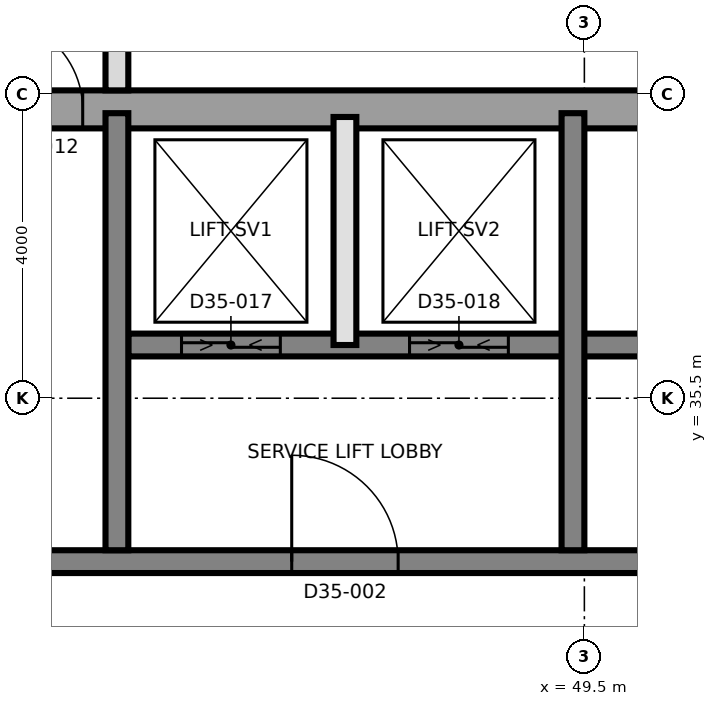
"""IFC4 building model, lengths in metres.
Left out: names, types, materials, properties, quantities, classifications, styles, units other than length and angle.
Written with IfcOpenShell. Run it as: python <this file> out.ifc"""

import sys

from ifc_helpers import new_model, si_unit, direction, frame, frame_2d, origin, place, context, subcontext, project, spatial, rectangle, extrude, element, fill, save


model = new_model("IFC4")
c1 = context("Model", 3, precision=1e-05, world=origin(), true_north=direction((0.0, 1.0)))
c2 = subcontext(c1, "Body", "Model", "MODEL_VIEW")
j1 = project(units=[si_unit("LENGTHUNIT", "METRE"), si_unit("PLANEANGLEUNIT", "RADIAN")], contexts=[c1])
p1 = place(None, origin())
s1 = spatial("IfcSite", under=j1, at=p1, CompositionType="ELEMENT")
p2 = place(p1, origin())
s2 = spatial("IfcBuilding", under=s1, at=p2, CompositionType="ELEMENT")
p3 = place(p2, frame((0.0, 0.0, 195.8)))
s3 = spatial("IfcBuildingStorey", under=s2, at=p3, CompositionType="ELEMENT", Elevation=195.8)
p4 = place(p3, frame((31.25, 39.3, 0.0), z_axis=(0.0, 0.0, 1.0), x_axis=(1.0, 0.0, 0.0)))
e1 = element("IfcWall", 1, at=p4, inside=s3, PredefinedType="SHEAR", context=c2, shape_type="SweptSolid", body=[
    extrude(rectangle(XDim=27.0, YDim=0.5, at=frame_2d((13.5, 0.0))), origin(), (0.0, 0.0, 1.0), 3.7),
])
p5 = place(p4, frame((10.45, 0.0, 0.0)))
e2 = element("IfcOpeningElement", 2, at=p5, cuts=e1, PredefinedType="OPENING", context=c2, shape_type="SweptSolid", body=[
    extrude(rectangle(XDim=1.2, YDim=2.1, at=frame_2d((0.6, 1.05))), frame((0.0, 0.26, 0.0), z_axis=(0.0, -1.0, 0.0), x_axis=(1.0, 0.0, 0.0)), (0.0, 0.0, 1.0), 0.52),
])
p6 = place(p3, frame((31.75, 33.35, 0.0), z_axis=(0.0, 0.0, 1.0), x_axis=(1.0, 0.0, 0.0)))
e3 = element("IfcWall", 3, at=p6, inside=s3, PredefinedType="SHEAR", context=c2, shape_type="SweptSolid", body=[
    extrude(rectangle(XDim=26.5, YDim=0.3, at=frame_2d((13.25, 0.0))), origin(), (0.0, 0.0, 1.0), 3.7),
])
p7 = place(p6, frame((13.9, 0.0, 0.0)))
e4 = element("IfcOpeningElement", 4, at=p7, cuts=e3, PredefinedType="OPENING", context=c2, shape_type="SweptSolid", body=[
    extrude(rectangle(XDim=1.4, YDim=2.1, at=frame_2d((0.7, 1.05))), frame((0.0, 0.16, 0.0), z_axis=(0.0, -1.0, 0.0), x_axis=(1.0, 0.0, 0.0)), (0.0, 0.0, 1.0), 0.32),
])
p8 = place(p6, frame((5.375, 0.0, 0.0)))
e5 = element("IfcOpeningElement", 5, at=p8, cuts=e3, PredefinedType="OPENING", context=c2, shape_type="SweptSolid", body=[
    extrude(rectangle(XDim=1.2, YDim=2.1, at=frame_2d((0.6, 1.05))), frame((0.0, 0.16, 0.0), z_axis=(0.0, -1.0, 0.0), x_axis=(1.0, 0.0, 0.0)), (0.0, 0.0, 1.0), 0.32),
])
p9 = place(p6, frame((19.925, 0.0, 0.0)))
e6 = element("IfcOpeningElement", 6, at=p9, cuts=e3, PredefinedType="OPENING", context=c2, shape_type="SweptSolid", body=[
    extrude(rectangle(XDim=1.2, YDim=2.1, at=frame_2d((0.6, 1.05))), frame((0.0, 0.16, 0.0), z_axis=(0.0, -1.0, 0.0), x_axis=(1.0, 0.0, 0.0)), (0.0, 0.0, 1.0), 0.32),
])
p10 = place(p3, frame((43.5, 36.2, 0.0), z_axis=(0.0, 0.0, 1.0), x_axis=(1.0, 0.0, 0.0)))
e7 = element("IfcWall", 7, at=p10, inside=s3, PredefinedType="SHEAR", context=c2, shape_type="SweptSolid", body=[
    extrude(rectangle(XDim=14.75, YDim=0.3, at=frame_2d((7.375, 0.0))), origin(), (0.0, 0.0, 1.0), 3.7),
])
p11 = place(p10, frame((6.9, 0.0, 0.0)))
e8 = element("IfcOpeningElement", 8, at=p11, cuts=e7, PredefinedType="OPENING", context=c2, shape_type="SweptSolid", body=[
    extrude(rectangle(XDim=1.2, YDim=2.1, at=frame_2d((0.6, 1.05))), frame((0.0, 0.16, 0.0), z_axis=(0.0, -1.0, 0.0), x_axis=(1.0, 0.0, 0.0)), (0.0, 0.0, 1.0), 0.32),
])
p12 = place(p10, frame((0.7, 0.0, 0.0)))
e9 = element("IfcOpeningElement", 9, at=p12, cuts=e7, PredefinedType="OPENING", context=c2, shape_type="SweptSolid", body=[
    extrude(rectangle(XDim=1.3, YDim=2.4, at=frame_2d((0.65, 1.2))), frame((0.0, 0.16, 0.0), z_axis=(0.0, -1.0, 0.0), x_axis=(1.0, 0.0, 0.0)), (0.0, 0.0, 1.0), 0.32),
])
p13 = place(p10, frame((3.7, 0.0, 0.0)))
e10 = element("IfcOpeningElement", 10, at=p13, cuts=e7, PredefinedType="OPENING", context=c2, shape_type="SweptSolid", body=[
    extrude(rectangle(XDim=1.3, YDim=2.4, at=frame_2d((0.65, 1.2))), frame((0.0, 0.16, 0.0), z_axis=(0.0, -1.0, 0.0), x_axis=(1.0, 0.0, 0.0)), (0.0, 0.0, 1.0), 0.32),
])
for number, where, z_axis, x_axis in (
    (11, (43.35, 33.5, 0.0), (0.0, 0.0, 1.0), (0.0, 1.0, 0.0)),
    (12, (49.35, 33.5, 0.0), (0.0, 0.0, 1.0), (0.0, 1.0, 0.0)),
):
    element("IfcWall", number, at=place(p3, frame(where, z_axis=z_axis, x_axis=x_axis)), inside=s3, PredefinedType="SHEAR", context=c2, shape_type="SweptSolid", body=[
        extrude(rectangle(XDim=5.75, YDim=0.3, at=frame_2d((2.875, 0.0))), origin(), (0.0, 0.0, 1.0), 3.7),
    ])
p14 = place(p3, frame((46.35, 36.2, 0.0), z_axis=(0.0, 0.0, 1.0), x_axis=(0.0, 1.0, 0.0)))
e13 = element("IfcWall", 13, at=p14, inside=s3, PredefinedType="SOLIDWALL", context=c2, shape_type="SweptSolid", body=[
    extrude(rectangle(XDim=3.0, YDim=0.3, at=frame_2d((1.5, 0.0))), origin(), (0.0, 0.0, 1.0), 3.4),
])
p15 = place(p3, frame((43.35, 39.55, 0.0), z_axis=(0.0, 0.0, 1.0), x_axis=(0.0, 1.0, 0.0)))
e14 = element("IfcWall", 14, at=p15, inside=s3, PredefinedType="PARTITIONING", context=c2, shape_type="SweptSolid", body=[
    extrude(rectangle(XDim=18.993, YDim=0.3, at=frame_2d((9.497, 0.0))), origin(), (0.0, 0.0, 1.0), 3.4),
])
p16 = place(p15, frame((2.3, 0.0, 0.0)))
e15 = element("IfcOpeningElement", 15, at=p16, cuts=e14, PredefinedType="OPENING", context=c2, shape_type="SweptSolid", body=[
    extrude(rectangle(XDim=1.0, YDim=2.4, at=frame_2d((0.5, 1.2))), frame((0.0, 0.16, 0.0), z_axis=(0.0, -1.0, 0.0), x_axis=(1.0, 0.0, 0.0)), (0.0, 0.0, 1.0), 0.32),
])
p17 = place(p15, frame((14.6, 0.0, 0.0)))
e16 = element("IfcOpeningElement", 16, at=p17, cuts=e14, PredefinedType="OPENING", context=c2, shape_type="SweptSolid", body=[
    extrude(rectangle(XDim=1.0, YDim=2.4, at=frame_2d((0.5, 1.2))), frame((0.0, 0.16, 0.0), z_axis=(0.0, -1.0, 0.0), x_axis=(1.0, 0.0, 0.0)), (0.0, 0.0, 1.0), 0.32),
])
p18 = place(p7, origin())
e17 = element("IfcDoor", 17, at=p18, inside=s3, OperationType="SINGLE_SWING_RIGHT", PredefinedType="DOOR", context=c2, shape_type="SweptSolid", body=[
    extrude(rectangle(XDim=1.4, YDim=2.1, at=frame_2d((0.7, 1.05))), frame((0.0, 0.025, 0.0), z_axis=(0.0, -1.0, 0.0), x_axis=(1.0, 0.0, 0.0)), (0.0, 0.0, 1.0), 0.05),
])
fill(e4, e17)
p19 = place(p5, origin())
e18 = element("IfcDoor", 18, at=p19, inside=s3, OperationType="SINGLE_SWING_RIGHT", PredefinedType="DOOR", context=c2, shape_type="SweptSolid", body=[
    extrude(rectangle(XDim=1.2, YDim=2.1, at=frame_2d((0.6, 1.05))), frame((0.0, 0.025, 0.0), z_axis=(0.0, -1.0, 0.0), x_axis=(1.0, 0.0, 0.0)), (0.0, 0.0, 1.0), 0.05),
])
fill(e2, e18)
p20 = place(p12, origin())
e19 = element("IfcDoor", 19, at=p20, inside=s3, OperationType="SLIDING_TO_LEFT", PredefinedType="DOOR", context=c2, shape_type="SweptSolid", body=[
    extrude(rectangle(XDim=1.3, YDim=2.4, at=frame_2d((0.65, 1.2))), frame((0.0, 0.025, 0.0), z_axis=(0.0, -1.0, 0.0), x_axis=(1.0, 0.0, 0.0)), (0.0, 0.0, 1.0), 0.05),
])
fill(e9, e19)
p21 = place(p13, origin())
e20 = element("IfcDoor", 20, at=p21, inside=s3, OperationType="SLIDING_TO_LEFT", PredefinedType="DOOR", context=c2, shape_type="SweptSolid", body=[
    extrude(rectangle(XDim=1.3, YDim=2.4, at=frame_2d((0.65, 1.2))), frame((0.0, 0.025, 0.0), z_axis=(0.0, -1.0, 0.0), x_axis=(1.0, 0.0, 0.0)), (0.0, 0.0, 1.0), 0.05),
])
fill(e10, e20)
save(model, sys.argv[1])
